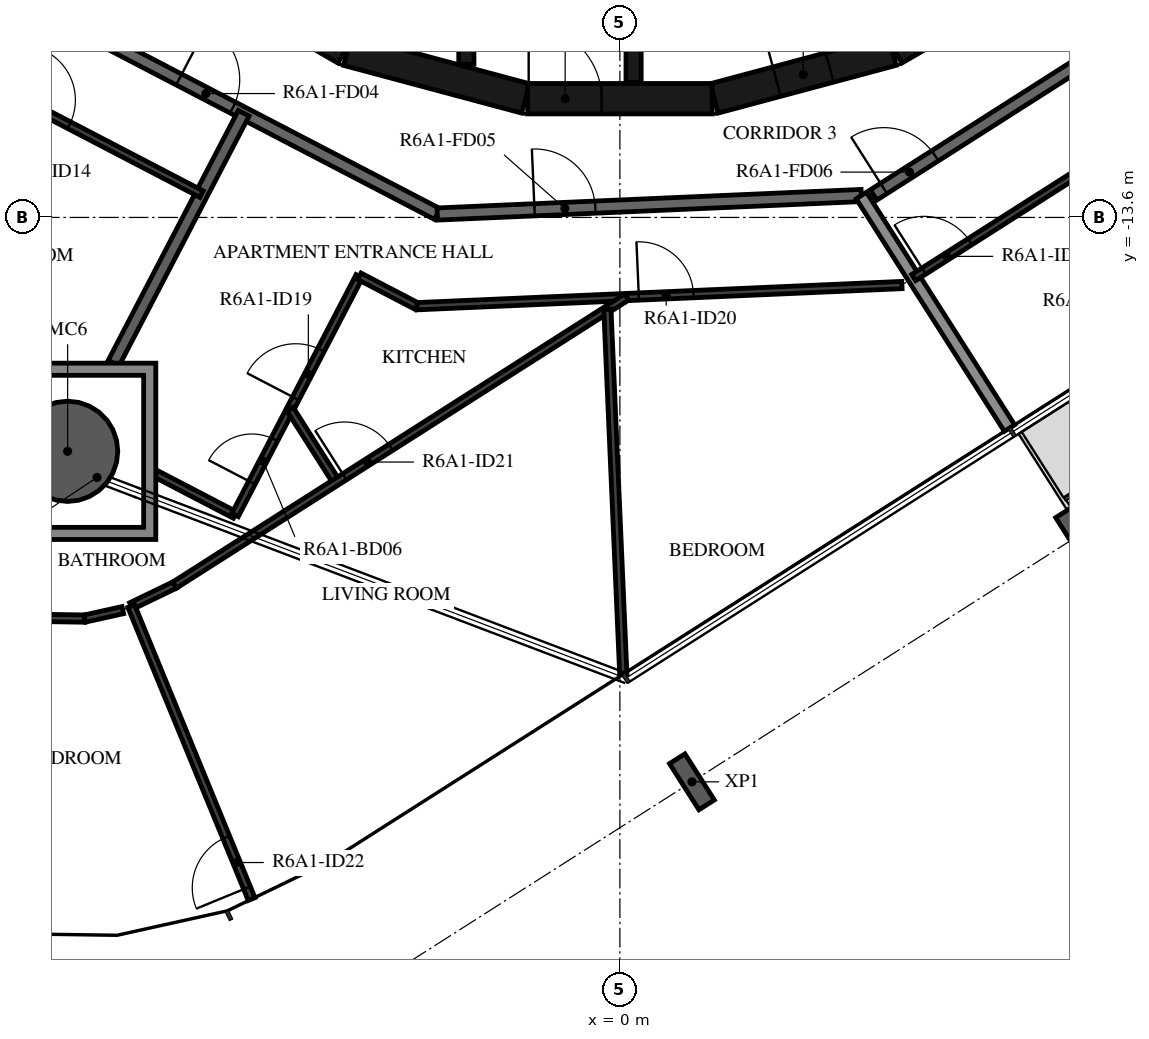
"""IFC4 building model, lengths in metres.
Left out: names, types, materials, properties, quantities, classifications, styles, units other than length and angle.
Written with IfcOpenShell. Run it as: python <this file> out.ifc"""

import sys

from ifc_helpers import new_model, si_unit, direction, frame, frame_2d, origin, origin_2d, place, context, subcontext, project, spatial, polyline, rectangle, hollow_circle, i_section, outline, extrude, element, fill, save


model = new_model("IFC4")
c1 = context("Model", 3, precision=1e-05, world=origin(), true_north=direction((0.0, 1.0)))
c2 = subcontext(c1, "Body", "Model", "MODEL_VIEW")
j1 = project(units=[si_unit("LENGTHUNIT", "METRE"), si_unit("PLANEANGLEUNIT", "RADIAN")], contexts=[c1])
p1 = place(None, origin())
s1 = spatial("IfcSite", under=j1, at=p1, CompositionType="ELEMENT")
p2 = place(p1, origin())
s2 = spatial("IfcBuilding", under=s1, at=p2, CompositionType="ELEMENT")
p3 = place(p2, frame((0.0, 0.0, 230.2)))
s3 = spatial("IfcBuildingStorey", under=s2, at=p3, CompositionType="ELEMENT", Elevation=230.2)
p4 = place(p3, frame((-9.082, -17.446, -0.38), z_axis=(0.0, 0.0, 1.0), x_axis=(1.0, 0.0, 0.0)))
e1 = element("IfcColumn", 1, at=p4, inside=s3, PredefinedType="COLUMN", context=c2, shape_type="SweptSolid", body=[
    extrude(hollow_circle(Radius=0.825, WallThickness=0.04, at=origin_2d()), origin(), (0.0, 0.0, 1.0), 3.5),
])
for number, where, z_axis, x_axis in (
    (2, (1.185, -22.881, -0.38), (0.0, 0.0, 1.0), (-0.843, -0.537, 0.0)),
    (3, (7.535, -18.835, -0.38), (0.0, 0.0, 1.0), (-0.843, -0.537, 0.0)),
):
    element("IfcColumn", number, at=place(p3, frame(where, z_axis=z_axis, x_axis=x_axis)), inside=s3, PredefinedType="COLUMN", context=c2, shape_type="SweptSolid", body=[
        extrude(i_section(OverallWidth=0.3, OverallDepth=0.9, WebThickness=0.019, FlangeThickness=0.035, FilletRadius=0.03, at=origin_2d()), origin(), (0.0, 0.0, 1.0), 3.5),
    ])
p5 = place(p3, frame((1.55, -11.643, 0.0), z_axis=(0.0, 0.0, 1.0), x_axis=(0.965948410781, 0.258734743916, 0.0)))
e4 = element("IfcWall", 4, at=p5, inside=s3, PredefinedType="SHEAR", context=c2, shape_type="SweptSolid", body=[
    extrude(rectangle(XDim=3.033, YDim=0.5, at=frame_2d((1.516, 0.0))), origin(), (0.0, 0.0, 1.0), 3.12),
])
p6 = place(p5, frame((1.066, 0.0, 0.0)))
e5 = element("IfcOpeningElement", 5, at=p6, cuts=e4, PredefinedType="OPENING", context=c2, shape_type="SweptSolid", body=[
    extrude(rectangle(XDim=0.9, YDim=2.1, at=frame_2d((0.45, 1.05))), frame((0.0, 0.26, 0.0), z_axis=(0.0, -1.0, 0.0), x_axis=(1.0, 0.0, 0.0)), (0.0, 0.0, 1.0), 0.52),
])
for number, where, z_axis, x_axis in (
    (6, (4.51, -10.845, 0.0), (0.0, 0.0, 1.0), (0.866, 0.5, 0.0)),
    (7, (-7.137, -9.329, 0.0), (0.0, 0.0, 1.0), (0.866, -0.5, 0.0)),
    (8, (-4.479, -10.858, 0.0), (0.0, 0.0, 1.0), (0.966, -0.259, 0.0)),
):
    element("IfcWall", number, at=place(p3, frame(where, z_axis=z_axis, x_axis=x_axis)), inside=s3, PredefinedType="SHEAR", context=c2, shape_type="SweptSolid", body=[
        extrude(rectangle(XDim=3.033, YDim=0.5, at=frame_2d((1.516, 0.0))), origin(), (0.0, 0.0, 1.0), 3.12),
    ])
p7 = place(p3, frame((-1.516, -11.647, 0.0), z_axis=(0.0, 0.0, 1.0), x_axis=(1.0, 0.0, 0.0)))
e9 = element("IfcWall", 9, at=p7, inside=s3, PredefinedType="SHEAR", context=c2, shape_type="SweptSolid", body=[
    extrude(rectangle(XDim=3.033, YDim=0.5, at=frame_2d((1.516, 0.0))), origin(), (0.0, 0.0, 1.0), 3.12),
])
p8 = place(p7, frame((0.016, 0.0, 0.0)))
e10 = element("IfcOpeningElement", 10, at=p8, cuts=e9, PredefinedType="OPENING", context=c2, shape_type="SweptSolid", body=[
    extrude(rectangle(XDim=1.2, YDim=2.1, at=frame_2d((0.6, 1.05))), frame((0.0, 0.26, 0.0), z_axis=(0.0, -1.0, 0.0), x_axis=(1.0, 0.0, 0.0)), (0.0, 0.0, 1.0), 0.52),
])
p9 = place(p3, frame((-2.525, -8.97, 0.0), z_axis=(0.0, 0.0, 1.0), x_axis=(0.0, -1.0, 0.0)))
e11 = element("IfcWall", 11, at=p9, inside=s3, PredefinedType="SHEAR", context=c2, shape_type="SweptSolid", body=[
    extrude(rectangle(XDim=2.11, YDim=0.25, at=frame_2d((1.055, 0.0))), origin(), (0.0, 0.0, 1.0), 3.12),
])
p10 = place(p3, frame((0.225, -8.97, 0.0), z_axis=(0.0, 0.0, 1.0), x_axis=(0.0, -1.0, 0.0)))
e12 = element("IfcWall", 12, at=p10, inside=s3, PredefinedType="SHEAR", context=c2, shape_type="SweptSolid", body=[
    extrude(rectangle(XDim=2.41, YDim=0.25, at=frame_2d((1.205, 0.0))), origin(), (0.0, 0.0, 1.0), 3.12),
])
p11 = place(p3, frame((-9.372, -10.228, 0.0), z_axis=(0.0, 0.0, 1.0), x_axis=(0.887005184532, -0.461759464021, 0.0)))
e13 = element("IfcWall", 13, at=p11, inside=s3, PredefinedType="STANDARD", context=c2, shape_type="SweptSolid", body=[
    extrude(rectangle(XDim=7.181, YDim=0.2, at=frame_2d((3.591, 0.0))), origin(), (0.0, 0.0, 1.0), 3.12),
])
p12 = place(p11, frame((2.391, 0.0, 0.0)))
e14 = element("IfcOpeningElement", 14, at=p12, cuts=e13, PredefinedType="OPENING", context=c2, shape_type="SweptSolid", body=[
    extrude(rectangle(XDim=1.0, YDim=2.1, at=frame_2d((0.5, 1.05))), frame((0.0, 0.11, 0.0), z_axis=(0.0, -1.0, 0.0), x_axis=(1.0, 0.0, 0.0)), (0.0, 0.0, 1.0), 0.22),
])
p13 = place(p3, frame((-3.003, -13.544, 0.0), z_axis=(0.0, 0.0, 1.0), x_axis=(0.999048221872, 0.043619380718, 0.0)))
e15 = element("IfcWall", 15, at=p13, inside=s3, PredefinedType="STANDARD", context=c2, shape_type="SweptSolid", body=[
    extrude(rectangle(XDim=6.979, YDim=0.2, at=frame_2d((3.49, 0.0))), origin(), (0.0, 0.0, 1.0), 3.12),
])
p14 = place(p13, frame((1.6, 0.0, 0.0)))
e16 = element("IfcOpeningElement", 16, at=p14, cuts=e15, PredefinedType="OPENING", context=c2, shape_type="SweptSolid", body=[
    extrude(rectangle(XDim=1.0, YDim=2.1, at=frame_2d((0.5, 1.05))), frame((0.0, 0.11, 0.0), z_axis=(0.0, -1.0, 0.0), x_axis=(1.0, 0.0, 0.0)), (0.0, 0.0, 1.0), 0.22),
])
p15 = place(p3, frame((4.172, -13.231, 0.0), z_axis=(0.0, 0.0, 1.0), x_axis=(0.843388394728, 0.537304397561, 0.0)))
e17 = element("IfcWall", 17, at=p15, inside=s3, PredefinedType="STANDARD", context=c2, shape_type="SweptSolid", body=[
    extrude(rectangle(XDim=7.181, YDim=0.2, at=frame_2d((3.59, 0.0))), origin(), (0.0, 0.0, 1.0), 3.12),
])
p16 = place(p15, frame((0.2, 0.0, 0.0)))
e18 = element("IfcOpeningElement", 18, at=p16, cuts=e17, PredefinedType="OPENING", context=c2, shape_type="SweptSolid", body=[
    extrude(rectangle(XDim=1.0, YDim=2.1, at=frame_2d((0.5, 1.05))), frame((0.0, 0.11, 0.0), z_axis=(0.0, -1.0, 0.0), x_axis=(1.0, 0.0, 0.0)), (0.0, 0.0, 1.0), 0.22),
])
p17 = place(p3, frame((-8.326, -15.996, 0.0), z_axis=(0.0, 0.0, 1.0), x_axis=(0.461739255077, 0.887015704664, 0.0)))
e19 = element("IfcWall", 19, at=p17, inside=s3, PredefinedType="STANDARD", context=c2, shape_type="SweptSolid", body=[
    extrude(rectangle(XDim=4.633, YDim=0.2, at=frame_2d((2.317, 0.0))), origin(), (0.0, 0.0, 1.0), 3.12),
])
p18 = place(p3, frame((6.407, -17.064, 0.0), z_axis=(0.0, 0.0, 1.0), x_axis=(-0.537324777979, 0.843375410461, 0.0)))
e20 = element("IfcWall", 20, at=p18, inside=s3, PredefinedType="STANDARD", context=c2, shape_type="SweptSolid", body=[
    extrude(rectangle(XDim=4.535, YDim=0.2, at=frame_2d((2.268, 0.0))), origin(), (0.0, 0.0, 1.0), 2.73),
])
p19 = place(p3, frame((-10.421, -11.373, 0.0), z_axis=(0.0, 0.0, 1.0), x_axis=(0.887006451745, -0.461757029792, 0.0)))
e21 = element("IfcWall", 21, at=p19, inside=s3, PredefinedType="PARTITIONING", context=c2, shape_type="SweptSolid", body=[
    extrude(rectangle(XDim=3.992, YDim=0.12, at=frame_2d((1.996, 0.0))), origin(), (0.0, 0.0, 1.0), 3.12),
])
p20 = place(p19, frame((0.639, 0.0, 0.0)))
e22 = element("IfcOpeningElement", 22, at=p20, cuts=e21, PredefinedType="OPENING", context=c2, shape_type="SweptSolid", body=[
    extrude(rectangle(XDim=0.9, YDim=2.1, at=frame_2d((0.45, 1.05))), frame((0.0, 0.07, 0.0), z_axis=(0.0, -1.0, 0.0), x_axis=(1.0, 0.0, 0.0)), (0.0, 0.0, 1.0), 0.14),
])
p21 = place(p3, frame((-7.632, -17.815, 0.0), z_axis=(0.0, 0.0, 1.0), x_axis=(0.886960889958, -0.461844540602, 0.0)))
e23 = element("IfcWall", 23, at=p21, inside=s3, PredefinedType="PARTITIONING", context=c2, shape_type="SweptSolid", body=[
    extrude(rectangle(XDim=1.469, YDim=0.12, at=frame_2d((0.734, 0.0))), origin(), (0.0, 0.0, 1.0), 3.12),
])
p22 = place(p3, frame((-6.329, -18.494, 0.0), z_axis=(0.0, 0.0, 1.0), x_axis=(0.461759058182, 0.887005395805, 0.0)))
e24 = element("IfcWall", 24, at=p22, inside=s3, PredefinedType="PARTITIONING", context=c2, shape_type="SweptSolid", body=[
    extrude(rectangle(XDim=4.427, YDim=0.12, at=frame_2d((2.213, 0.0))), origin(), (0.0, 0.0, 1.0), 3.12),
])
p23 = place(p22, frame((0.6, 0.0, 0.0)))
e25 = element("IfcOpeningElement", 25, at=p23, cuts=e24, PredefinedType="OPENING", context=c2, shape_type="SweptSolid", body=[
    extrude(rectangle(XDim=0.8, YDim=2.1, at=frame_2d((0.4, 1.05))), frame((0.0, 0.07, 0.0), z_axis=(0.0, -1.0, 0.0), x_axis=(1.0, 0.0, 0.0)), (0.0, 0.0, 1.0), 0.14),
])
p24 = place(p22, frame((2.161, 0.0, 0.0)))
e26 = element("IfcOpeningElement", 26, at=p24, cuts=e24, PredefinedType="OPENING", context=c2, shape_type="SweptSolid", body=[
    extrude(rectangle(XDim=0.9, YDim=2.1, at=frame_2d((0.45, 1.05))), frame((0.0, 0.07, 0.0), z_axis=(0.0, -1.0, 0.0), x_axis=(1.0, 0.0, 0.0)), (0.0, 0.0, 1.0), 0.14),
])
p25 = place(p3, frame((-4.285, -14.567, 0.0), z_axis=(0.0, 0.0, 1.0), x_axis=(0.887033177378, -0.46170568789, 0.0)))
e27 = element("IfcWall", 27, at=p25, inside=s3, PredefinedType="PARTITIONING", context=c2, shape_type="SweptSolid", body=[
    extrude(rectangle(XDim=1.067, YDim=0.12, at=frame_2d((0.534, 0.0))), origin(), (0.0, 0.0, 1.0), 3.12),
])
p26 = place(p3, frame((-3.339, -15.06, 0.0), z_axis=(0.0, 0.0, 1.0), x_axis=(0.999047716945, 0.043630943905, 0.0)))
e28 = element("IfcWall", 28, at=p26, inside=s3, PredefinedType="PARTITIONING", context=c2, shape_type="SweptSolid", body=[
    extrude(rectangle(XDim=7.985, YDim=0.12, at=frame_2d((3.992, 0.0))), origin(), (0.0, 0.0, 1.0), 3.12),
])
p27 = place(p26, frame((3.654, 0.0, 0.0)))
e29 = element("IfcOpeningElement", 29, at=p27, cuts=e28, PredefinedType="OPENING", context=c2, shape_type="SweptSolid", body=[
    extrude(rectangle(XDim=0.9, YDim=2.1, at=frame_2d((0.45, 1.05))), frame((0.0, 0.07, 0.0), z_axis=(0.0, -1.0, 0.0), x_axis=(1.0, 0.0, 0.0)), (0.0, 0.0, 1.0), 0.14),
])
for number, where, z_axis, x_axis in (
    (30, (-9.443, -20.187, 0.0), (0.0, 0.0, 1.0), (1.0, -0.014, 0.0)),
    (31, (-8.801, -20.197, 0.0), (0.0, 0.0, 1.0), (0.976, 0.216, 0.0)),
):
    element("IfcWall", number, at=place(p3, frame(where, z_axis=z_axis, x_axis=x_axis)), inside=s3, PredefinedType="PARTITIONING", context=c2, shape_type="SweptSolid", body=[
        extrude(rectangle(XDim=0.642, YDim=0.12, at=frame_2d((0.321, 0.0))), origin(), (0.0, 0.0, 1.0), 3.12),
    ])
p28 = place(p3, frame((-4.662, -17.95, 0.0), z_axis=(0.0, 0.0, 1.0), x_axis=(-0.537254271207, 0.843420327043, 0.0)))
e32 = element("IfcWall", 32, at=p28, inside=s3, PredefinedType="PARTITIONING", context=c2, shape_type="SweptSolid", body=[
    extrude(rectangle(XDim=1.418, YDim=0.12, at=frame_2d((0.709, 0.0))), origin(), (0.0, 0.0, 1.0), 3.12),
])
p29 = place(p3, frame((-8.037, -19.991, 0.0), z_axis=(0.0, 0.0, 1.0), x_axis=(0.900073671326, 0.435737749323, 0.0)))
e33 = element("IfcWall", 33, at=p29, inside=s3, PredefinedType="PARTITIONING", context=c2, shape_type="SweptSolid", body=[
    extrude(rectangle(XDim=0.794, YDim=0.12, at=frame_2d((0.397, 0.0))), origin(), (0.0, 0.0, 1.0), 3.12),
])
p30 = place(p3, frame((-7.322, -19.645, 0.0), z_axis=(0.0, 0.0, 1.0), x_axis=(0.843385361817, 0.537309158188, 0.0)))
e34 = element("IfcWall", 34, at=p30, inside=s3, PredefinedType="PARTITIONING", context=c2, shape_type="SweptSolid", body=[
    extrude(rectangle(XDim=8.814, YDim=0.12, at=frame_2d((4.407, 0.0))), origin(), (0.0, 0.0, 1.0), 3.12),
])
p31 = place(p30, frame((3.314, 0.0, 0.0)))
e35 = element("IfcOpeningElement", 35, at=p31, cuts=e34, PredefinedType="OPENING", context=c2, shape_type="SweptSolid", body=[
    extrude(rectangle(XDim=0.9, YDim=2.1, at=frame_2d((0.45, 1.05))), frame((0.0, 0.07, 0.0), z_axis=(0.0, -1.0, 0.0), x_axis=(1.0, 0.0, 0.0)), (0.0, 0.0, 1.0), 0.14),
])
p32 = place(p3, frame((-6.057, -24.81, 0.0), z_axis=(0.0, 0.0, 1.0), x_axis=(-0.380052033163, 0.924965108579, 0.0)))
e36 = element("IfcWall", 36, at=p32, inside=s3, PredefinedType="PARTITIONING", context=c2, shape_type="SweptSolid", body=[
    extrude(rectangle(XDim=5.21, YDim=0.12, at=frame_2d((2.605, 0.0))), origin(), (0.0, 0.0, 1.0), 3.12),
])
p33 = place(p32, frame((0.2, 0.0, 0.0)))
e37 = element("IfcOpeningElement", 37, at=p33, cuts=e36, PredefinedType="OPENING", context=c2, shape_type="SweptSolid", body=[
    extrude(rectangle(XDim=0.9, YDim=2.1, at=frame_2d((0.45, 1.05))), frame((0.0, 0.07, 0.0), z_axis=(0.0, -1.0, 0.0), x_axis=(1.0, 0.0, 0.0)), (0.0, 0.0, 1.0), 0.14),
])
p34 = place(p3, frame((0.056, -21.11, 0.0), z_axis=(0.0, 0.0, 1.0), x_axis=(-0.043629559022, 0.999047777426, 0.0)))
e38 = element("IfcWall", 38, at=p34, inside=s3, PredefinedType="PARTITIONING", context=c2, shape_type="SweptSolid", body=[
    extrude(rectangle(XDim=6.004, YDim=0.12, at=frame_2d((3.002, 0.0))), origin(), (0.0, 0.0, 1.0), 3.12),
])
p35 = place(p3, frame((4.83, -14.59, 0.0), z_axis=(0.0, 0.0, 1.0), x_axis=(0.843393042763, 0.537297101629, 0.0)))
e39 = element("IfcWall", 39, at=p35, inside=s3, PredefinedType="PARTITIONING", context=c2, shape_type="SweptSolid", body=[
    extrude(rectangle(XDim=7.53, YDim=0.12, at=frame_2d((3.765, 0.0))), origin(), (0.0, 0.0, 1.0), 3.12),
])
p36 = place(p35, frame((0.2, 0.0, 0.0)))
e40 = element("IfcOpeningElement", 40, at=p36, cuts=e39, PredefinedType="OPENING", context=c2, shape_type="SweptSolid", body=[
    extrude(rectangle(XDim=0.9, YDim=2.1, at=frame_2d((0.45, 1.05))), frame((0.0, 0.07, 0.0), z_axis=(0.0, -1.0, 0.0), x_axis=(1.0, 0.0, 0.0)), (0.0, 0.0, 1.0), 0.14),
])
p37 = place(p3, origin())
e41 = element("IfcWall", 41, at=p37, inside=s3, PredefinedType="STANDARD", context=c2, shape_type="SweptSolid", body=[
    extrude(outline(polyline([(-7.632, -15.996), (-7.632, -18.896), (-10.532, -18.896), (-10.532, -15.996), (-7.632, -15.996)]), holes=[polyline([(-10.332, -18.696), (-7.832, -18.696), (-7.832, -16.196), (-10.332, -16.196), (-10.332, -18.696)])]), origin(), (0.0, 0.0, 1.0), 3.12),
])
p38 = place(p8, origin())
e42 = element("IfcDoor", 42, at=p38, inside=s3, OperationType="SINGLE_SWING_RIGHT", PredefinedType="DOOR", context=c2, shape_type="SweptSolid", body=[
    extrude(rectangle(XDim=1.2, YDim=2.1, at=frame_2d((0.6, 1.05))), frame((0.0, 0.025, 0.0), z_axis=(0.0, -1.0, 0.0), x_axis=(1.0, 0.0, 0.0)), (0.0, 0.0, 1.0), 0.05),
])
fill(e10, e42)
p39 = place(p6, origin())
e43 = element("IfcDoor", 43, at=p39, inside=s3, OperationType="SINGLE_SWING_LEFT", PredefinedType="DOOR", context=c2, shape_type="SweptSolid", body=[
    extrude(rectangle(XDim=0.9, YDim=2.1, at=frame_2d((0.45, 1.05))), frame((0.0, 0.025, 0.0), z_axis=(0.0, -1.0, 0.0), x_axis=(1.0, 0.0, 0.0)), (0.0, 0.0, 1.0), 0.05),
])
fill(e5, e43)
p40 = place(p12, origin())
e44 = element("IfcDoor", 44, at=p40, inside=s3, OperationType="SINGLE_SWING_RIGHT", PredefinedType="DOOR", context=c2, shape_type="SweptSolid", body=[
    extrude(rectangle(XDim=1.0, YDim=2.1, at=frame_2d((0.5, 1.05))), frame((0.0, 0.025, 0.0), z_axis=(0.0, -1.0, 0.0), x_axis=(1.0, 0.0, 0.0)), (0.0, 0.0, 1.0), 0.05),
])
fill(e14, e44)
p41 = place(p20, origin())
e45 = element("IfcDoor", 45, at=p41, inside=s3, OperationType="SINGLE_SWING_RIGHT", PredefinedType="DOOR", context=c2, shape_type="SweptSolid", body=[
    extrude(rectangle(XDim=0.9, YDim=2.1, at=frame_2d((0.45, 1.05))), frame((0.0, 0.025, 0.0), z_axis=(0.0, -1.0, 0.0), x_axis=(1.0, 0.0, 0.0)), (0.0, 0.0, 1.0), 0.05),
])
fill(e22, e45)
p42 = place(p14, origin())
e46 = element("IfcDoor", 46, at=p42, inside=s3, OperationType="SINGLE_SWING_LEFT", PredefinedType="DOOR", context=c2, shape_type="SweptSolid", body=[
    extrude(rectangle(XDim=1.0, YDim=2.1, at=frame_2d((0.5, 1.05))), frame((0.0, 0.025, 0.0), z_axis=(0.0, -1.0, 0.0), x_axis=(1.0, 0.0, 0.0)), (0.0, 0.0, 1.0), 0.05),
])
fill(e16, e46)
p43 = place(p23, origin())
e47 = element("IfcDoor", 47, at=p43, inside=s3, OperationType="SINGLE_SWING_LEFT", PredefinedType="DOOR", context=c2, shape_type="SweptSolid", body=[
    extrude(rectangle(XDim=0.8, YDim=2.1, at=frame_2d((0.4, 1.05))), frame((0.0, 0.025, 0.0), z_axis=(0.0, -1.0, 0.0), x_axis=(1.0, 0.0, 0.0)), (0.0, 0.0, 1.0), 0.05),
])
fill(e25, e47)
p44 = place(p24, origin())
e48 = element("IfcDoor", 48, at=p44, inside=s3, OperationType="SINGLE_SWING_LEFT", PredefinedType="DOOR", context=c2, shape_type="SweptSolid", body=[
    extrude(rectangle(XDim=0.9, YDim=2.1, at=frame_2d((0.45, 1.05))), frame((0.0, 0.025, 0.0), z_axis=(0.0, -1.0, 0.0), x_axis=(1.0, 0.0, 0.0)), (0.0, 0.0, 1.0), 0.05),
])
fill(e26, e48)
p45 = place(p27, origin())
e49 = element("IfcDoor", 49, at=p45, inside=s3, OperationType="SINGLE_SWING_LEFT", PredefinedType="DOOR", context=c2, shape_type="SweptSolid", body=[
    extrude(rectangle(XDim=0.9, YDim=2.1, at=frame_2d((0.45, 1.05))), frame((0.0, 0.025, 0.0), z_axis=(0.0, -1.0, 0.0), x_axis=(1.0, 0.0, 0.0)), (0.0, 0.0, 1.0), 0.05),
])
fill(e29, e49)
p46 = place(p31, origin())
e50 = element("IfcDoor", 50, at=p46, inside=s3, OperationType="SINGLE_SWING_LEFT", PredefinedType="DOOR", context=c2, shape_type="SweptSolid", body=[
    extrude(rectangle(XDim=0.9, YDim=2.1, at=frame_2d((0.45, 1.05))), frame((0.0, 0.025, 0.0), z_axis=(0.0, -1.0, 0.0), x_axis=(1.0, 0.0, 0.0)), (0.0, 0.0, 1.0), 0.05),
])
fill(e35, e50)
p47 = place(p33, origin())
e51 = element("IfcDoor", 51, at=p47, inside=s3, OperationType="SINGLE_SWING_LEFT", PredefinedType="DOOR", context=c2, shape_type="SweptSolid", body=[
    extrude(rectangle(XDim=0.9, YDim=2.1, at=frame_2d((0.45, 1.05))), frame((0.0, 0.025, 0.0), z_axis=(0.0, -1.0, 0.0), x_axis=(1.0, 0.0, 0.0)), (0.0, 0.0, 1.0), 0.05),
])
fill(e37, e51)
p48 = place(p16, origin())
e52 = element("IfcDoor", 52, at=p48, inside=s3, OperationType="SINGLE_SWING_LEFT", PredefinedType="DOOR", context=c2, shape_type="SweptSolid", body=[
    extrude(rectangle(XDim=1.0, YDim=2.1, at=frame_2d((0.5, 1.05))), frame((0.0, 0.025, 0.0), z_axis=(0.0, -1.0, 0.0), x_axis=(1.0, 0.0, 0.0)), (0.0, 0.0, 1.0), 0.05),
])
fill(e18, e52)
p49 = place(p36, origin())
e53 = element("IfcDoor", 53, at=p49, inside=s3, OperationType="SINGLE_SWING_LEFT", PredefinedType="DOOR", context=c2, shape_type="SweptSolid", body=[
    extrude(rectangle(XDim=0.9, YDim=2.1, at=frame_2d((0.45, 1.05))), frame((0.0, 0.025, 0.0), z_axis=(0.0, -1.0, 0.0), x_axis=(1.0, 0.0, 0.0)), (0.0, 0.0, 1.0), 0.05),
])
fill(e40, e53)
save(model, sys.argv[1])
